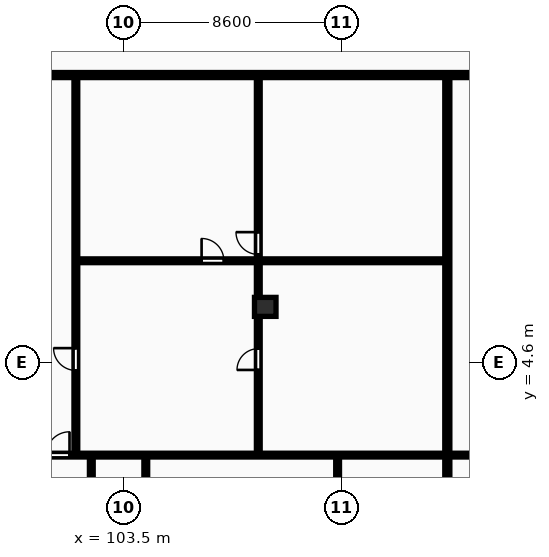
"""IFC4 building model, lengths in metres.
Left out: names, types, materials, properties, quantities, classifications, styles, units other than length and angle.
Written with IfcOpenShell. Run it as: python <this file> out.ifc"""

import sys

from ifc_helpers import new_model, si_unit, direction, frame, frame_2d, origin, origin_2d, place, context, subcontext, project, spatial, rectangle, extrude, element, fill, save


model = new_model("IFC4")
c1 = context("Model", 3, precision=1e-05, world=origin(), true_north=direction((0.0, 1.0)))
c2 = subcontext(c1, "Body", "Model", "MODEL_VIEW")
j1 = project(units=[si_unit("LENGTHUNIT", "METRE"), si_unit("PLANEANGLEUNIT", "RADIAN")], contexts=[c1])
p1 = place(None, origin())
s1 = spatial("IfcSite", under=j1, at=p1, CompositionType="ELEMENT")
p2 = place(p1, origin())
s2 = spatial("IfcBuilding", under=s1, at=p2, CompositionType="ELEMENT")
p3 = place(p2, frame((0.0, 0.0, 126.3)))
s3 = spatial("IfcBuildingStorey", under=s2, at=p3, CompositionType="ELEMENT", Elevation=126.3)
p4 = place(p3, frame((109.1, 6.8, 0.0), z_axis=(0.0, 0.0, 1.0), x_axis=(1.0, 0.0, 0.0)))
e1 = element("IfcColumn", 1, at=p4, inside=s3, PredefinedType="COLUMN", context=c2, shape_type="SweptSolid", body=[
    extrude(rectangle(XDim=0.85, YDim=0.75, at=origin_2d()), origin(), (0.0, 0.0, 1.0), 3.25),
])
p5 = place(p3, frame((116.286, -8.7, 0.0), z_axis=(0.0, 0.0, 1.0), x_axis=(0.0, 1.0, 0.0)))
e2 = element("IfcWall", 2, at=p5, inside=s3, PredefinedType="PARTITIONING", context=c2, shape_type="SweptSolid", body=[
    extrude(rectangle(XDim=24.57, YDim=0.2, at=frame_2d((12.285, 0.0))), origin(), (0.0, 0.0, 1.0), 2.97),
])
p6 = place(p3, frame((108.825, 0.99, 0.0), z_axis=(0.0, 0.0, 1.0), x_axis=(0.0, 1.0, 0.0)))
e3 = element("IfcWall", 3, at=p6, inside=s3, PredefinedType="PARTITIONING", context=c2, shape_type="SweptSolid", body=[
    extrude(rectangle(XDim=14.9, YDim=0.15, at=frame_2d((7.45, 0.0))), origin(), (0.0, 0.0, 1.0), 2.97),
])
p7 = place(p6, frame((3.321, 0.0, 0.0)))
e4 = element("IfcOpeningElement", 4, at=p7, cuts=e3, PredefinedType="OPENING", context=c2, shape_type="SweptSolid", body=[
    extrude(rectangle(XDim=0.84, YDim=2.04, at=frame_2d((0.42, 1.02))), frame((0.0, 0.085, 0.0), z_axis=(0.0, -1.0, 0.0), x_axis=(1.0, 0.0, 0.0)), (0.0, 0.0, 1.0), 0.17),
])
p8 = place(p6, frame((7.88, 0.0, 0.0)))
e5 = element("IfcOpeningElement", 5, at=p8, cuts=e3, PredefinedType="OPENING", context=c2, shape_type="SweptSolid", body=[
    extrude(rectangle(XDim=0.88, YDim=2.06, at=frame_2d((0.44, 1.03))), frame((0.0, 0.085, 0.0), z_axis=(0.0, -1.0, 0.0), x_axis=(1.0, 0.0, 0.0)), (0.0, 0.0, 1.0), 0.17),
])
p9 = place(p3, frame((101.685, 8.62, 0.0), z_axis=(0.0, 0.0, 1.0), x_axis=(1.0, 0.0, 0.0)))
e6 = element("IfcWall", 6, at=p9, inside=s3, PredefinedType="PARTITIONING", context=c2, shape_type="SweptSolid", body=[
    extrude(rectangle(XDim=14.522, YDim=0.15, at=frame_2d((7.261, 0.0))), origin(), (0.0, 0.0, 1.0), 2.97),
])
p10 = place(p9, frame((4.903, 0.0, 0.0)))
e7 = element("IfcOpeningElement", 7, at=p10, cuts=e6, PredefinedType="OPENING", context=c2, shape_type="SweptSolid", body=[
    extrude(rectangle(XDim=0.88, YDim=2.06, at=frame_2d((0.44, 1.03))), frame((0.0, 0.085, 0.0), z_axis=(0.0, -1.0, 0.0), x_axis=(1.0, 0.0, 0.0)), (0.0, 0.0, 1.0), 0.17),
])
p11 = place(p3, frame((101.625, 0.99, 0.0), z_axis=(0.0, 0.0, 1.0), x_axis=(0.0, 1.0, 0.0)))
e8 = element("IfcWall", 8, at=p11, inside=s3, PredefinedType="PARTITIONING", context=c2, shape_type="SweptSolid", body=[
    extrude(rectangle(XDim=14.9, YDim=0.15, at=frame_2d((7.45, 0.0))), origin(), (0.0, 0.0, 1.0), 2.97),
])
p12 = place(p11, frame((3.302, 0.0, 0.0)))
e9 = element("IfcOpeningElement", 9, at=p12, cuts=e8, PredefinedType="OPENING", context=c2, shape_type="SweptSolid", body=[
    extrude(rectangle(XDim=0.88, YDim=2.06, at=frame_2d((0.44, 1.03))), frame((0.0, 0.085, 0.0), z_axis=(0.0, -1.0, 0.0), x_axis=(1.0, 0.0, 0.0)), (0.0, 0.0, 1.0), 0.17),
])
p13 = place(p3, frame((104.385, -1.56, 0.0), z_axis=(0.0, 0.0, 1.0), x_axis=(0.0, 1.0, 0.0)))
e10 = element("IfcWall", 10, at=p13, inside=s3, PredefinedType="PARTITIONING", context=c2, shape_type="SweptSolid", body=[
    extrude(rectangle(XDim=2.47, YDim=0.15, at=frame_2d((1.235, 0.0))), origin(), (0.0, 0.0, 1.0), 2.97),
])
p14 = place(p3, frame((102.235, -8.7, 0.0), z_axis=(0.0, 0.0, 1.0), x_axis=(0.0, 1.0, 0.0)))
e11 = element("IfcWall", 11, at=p14, inside=s3, PredefinedType="PARTITIONING", context=c2, shape_type="SweptSolid", body=[
    extrude(rectangle(XDim=9.61, YDim=0.15, at=frame_2d((4.805, 0.0))), origin(), (0.0, 0.0, 1.0), 2.97),
])
p15 = place(p14, frame((5.92, 0.0, 0.0)))
e12 = element("IfcOpeningElement", 12, at=p15, cuts=e11, PredefinedType="OPENING", context=c2, shape_type="SweptSolid", body=[
    extrude(rectangle(XDim=0.92, YDim=2.08, at=frame_2d((0.46, 1.04))), frame((0.0, 0.085, 0.0), z_axis=(0.0, -1.0, 0.0), x_axis=(1.0, 0.0, 0.0)), (0.0, 0.0, 1.0), 0.17),
])
p16 = place(p3, frame((111.956, -1.56, 0.0), z_axis=(0.0, 0.0, 1.0), x_axis=(0.0, 1.0, 0.0)))
e13 = element("IfcWall", 13, at=p16, inside=s3, PredefinedType="PARTITIONING", context=c2, shape_type="SweptSolid", body=[
    extrude(rectangle(XDim=2.47, YDim=0.15, at=frame_2d((1.235, 0.0))), origin(), (0.0, 0.0, 1.0), 2.97),
])
p17 = place(p3, frame((97.735, 0.95, 0.0), z_axis=(0.0, 0.0, 1.0), x_axis=(1.0, 0.0, 0.0)))
e14 = element("IfcWall", 14, at=p17, inside=s3, PredefinedType="PARTITIONING", context=c2, shape_type="SweptSolid", body=[
    extrude(rectangle(XDim=18.472, YDim=0.15, at=frame_2d((9.236, 0.0))), origin(), (0.0, 0.0, 1.0), 2.97),
])
p18 = place(p17, frame((2.72, 0.0, 0.0)))
e15 = element("IfcOpeningElement", 15, at=p18, cuts=e14, PredefinedType="OPENING", context=c2, shape_type="SweptSolid", body=[
    extrude(rectangle(XDim=0.92, YDim=2.08, at=frame_2d((0.46, 1.04))), frame((0.0, 0.085, 0.0), z_axis=(0.0, -1.0, 0.0), x_axis=(1.0, 0.0, 0.0)), (0.0, 0.0, 1.0), 0.17),
])
p19 = place(p3, frame((116.366, 0.95, 0.0), z_axis=(0.0, 0.0, 1.0), x_axis=(1.0, 0.0, 0.0)))
e16 = element("IfcWall", 16, at=p19, inside=s3, PredefinedType="PARTITIONING", context=c2, shape_type="SweptSolid", body=[
    extrude(rectangle(XDim=14.254, YDim=0.15, at=frame_2d((7.127, 0.0))), origin(), (0.0, 0.0, 1.0), 2.97),
])
p20 = place(p19, frame((2.72, 0.0, 0.0)))
e17 = element("IfcOpeningElement", 17, at=p20, cuts=e16, PredefinedType="OPENING", context=c2, shape_type="SweptSolid", body=[
    extrude(rectangle(XDim=0.92, YDim=2.08, at=frame_2d((0.46, 1.04))), frame((0.0, 0.085, 0.0), z_axis=(0.0, -1.0, 0.0), x_axis=(1.0, 0.0, 0.0)), (0.0, 0.0, 1.0), 0.17),
])
p21 = place(p3, frame((72.7, 15.95, 0.0), z_axis=(0.0, 0.0, 1.0), x_axis=(1.0, 0.0, 0.0)))
e18 = element("IfcWall", 18, at=p21, inside=s3, PredefinedType="PARTITIONING", context=c2, shape_type="SweptSolid", body=[
    extrude(rectangle(XDim=58.0, YDim=0.2, at=frame_2d((29.0, 0.0))), origin(), (0.0, 0.0, 1.0), 2.97),
])
p22 = place(p21, frame((2.77, 0.0, 0.0)))
e19 = element("IfcOpeningElement", 19, at=p22, cuts=e18, PredefinedType="OPENING", context=c2, shape_type="SweptSolid", body=[
    extrude(rectangle(XDim=0.95, YDim=2.15, at=frame_2d((0.475, 1.075))), frame((0.0, 0.11, 0.0), z_axis=(0.0, -1.0, 0.0), x_axis=(1.0, 0.0, 0.0)), (0.0, 0.0, 1.0), 0.22),
])
p23 = place(p21, frame((25.324, 0.0, 0.0)))
e20 = element("IfcOpeningElement", 20, at=p23, cuts=e18, PredefinedType="OPENING", context=c2, shape_type="SweptSolid", body=[
    extrude(rectangle(XDim=0.95, YDim=2.15, at=frame_2d((0.475, 1.075))), frame((0.0, 0.11, 0.0), z_axis=(0.0, -1.0, 0.0), x_axis=(1.0, 0.0, 0.0)), (0.0, 0.0, 1.0), 0.22),
])
p24 = place(p21, frame((46.356, 0.0, 0.0)))
e21 = element("IfcOpeningElement", 21, at=p24, cuts=e18, PredefinedType="OPENING", context=c2, shape_type="SweptSolid", body=[
    extrude(rectangle(XDim=0.95, YDim=2.15, at=frame_2d((0.475, 1.075))), frame((0.0, 0.11, 0.0), z_axis=(0.0, -1.0, 0.0), x_axis=(1.0, 0.0, 0.0)), (0.0, 0.0, 1.0), 0.22),
])
p25 = place(p7, origin())
e22 = element("IfcDoor", 22, at=p25, inside=s3, OperationType="SINGLE_SWING_LEFT", PredefinedType="DOOR", context=c2, shape_type="SweptSolid", body=[
    extrude(rectangle(XDim=0.84, YDim=2.04, at=frame_2d((0.42, 1.02))), frame((0.0, 0.025, 0.0), z_axis=(0.0, -1.0, 0.0), x_axis=(1.0, 0.0, 0.0)), (0.0, 0.0, 1.0), 0.05),
])
fill(e4, e22)
p26 = place(p8, origin())
e23 = element("IfcDoor", 23, at=p26, inside=s3, OperationType="SINGLE_SWING_RIGHT", PredefinedType="DOOR", context=c2, shape_type="SweptSolid", body=[
    extrude(rectangle(XDim=0.88, YDim=2.06, at=frame_2d((0.44, 1.03))), frame((0.0, 0.025, 0.0), z_axis=(0.0, -1.0, 0.0), x_axis=(1.0, 0.0, 0.0)), (0.0, 0.0, 1.0), 0.05),
])
fill(e5, e23)
p27 = place(p10, origin())
e24 = element("IfcDoor", 24, at=p27, inside=s3, OperationType="SINGLE_SWING_LEFT", PredefinedType="DOOR", context=c2, shape_type="SweptSolid", body=[
    extrude(rectangle(XDim=0.88, YDim=2.06, at=frame_2d((0.44, 1.03))), frame((0.0, 0.025, 0.0), z_axis=(0.0, -1.0, 0.0), x_axis=(1.0, 0.0, 0.0)), (0.0, 0.0, 1.0), 0.05),
])
fill(e7, e24)
p28 = place(p12, origin())
e25 = element("IfcDoor", 25, at=p28, inside=s3, OperationType="SINGLE_SWING_RIGHT", PredefinedType="DOOR", context=c2, shape_type="SweptSolid", body=[
    extrude(rectangle(XDim=0.88, YDim=2.06, at=frame_2d((0.44, 1.03))), frame((0.0, 0.025, 0.0), z_axis=(0.0, -1.0, 0.0), x_axis=(1.0, 0.0, 0.0)), (0.0, 0.0, 1.0), 0.05),
])
fill(e9, e25)
p29 = place(p18, origin())
e26 = element("IfcDoor", 26, at=p29, inside=s3, OperationType="SINGLE_SWING_RIGHT", PredefinedType="DOOR", context=c2, shape_type="SweptSolid", body=[
    extrude(rectangle(XDim=0.92, YDim=2.08, at=frame_2d((0.46, 1.04))), frame((0.0, 0.025, 0.0), z_axis=(0.0, -1.0, 0.0), x_axis=(1.0, 0.0, 0.0)), (0.0, 0.0, 1.0), 0.05),
])
fill(e15, e26)
save(model, sys.argv[1])
